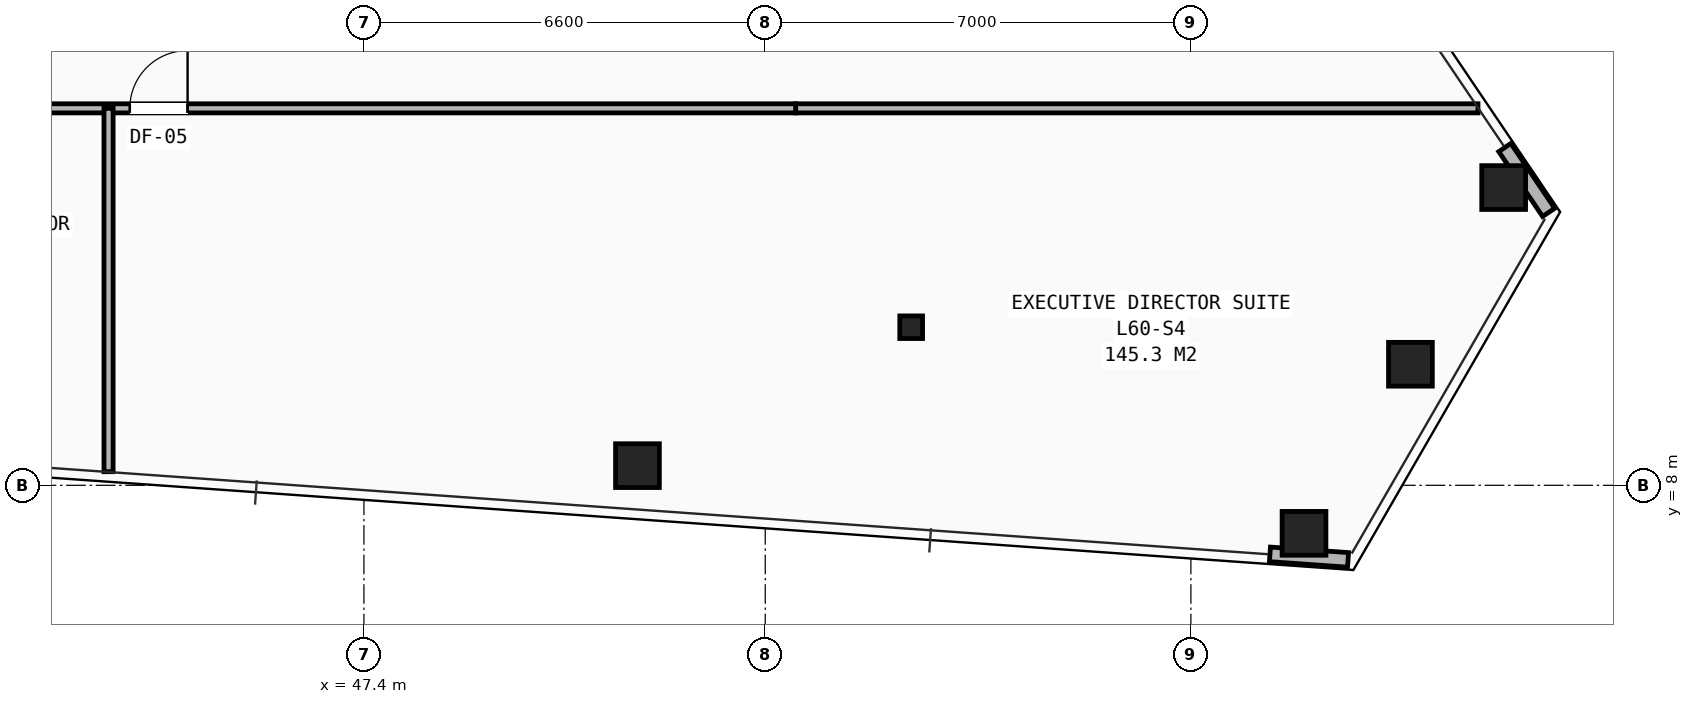
"""IFC4 building model, lengths in metres.
Left out: names, types, materials, properties, quantities, classifications, styles, units other than length and angle.
Written with IfcOpenShell. Run it as: python <this file> out.ifc"""

import sys

from ifc_helpers import new_model, si_unit, direction, frame, frame_2d, origin, origin_2d, place, context, subcontext, project, spatial, rectangle, hollow_rectangle, i_section, extrude, element, fill, save


model = new_model("IFC4")
c1 = context("Model", 3, precision=1e-05, world=origin(), true_north=direction((0.0, 1.0)))
c2 = subcontext(c1, "Body", "Model", "MODEL_VIEW")
j1 = project(units=[si_unit("LENGTHUNIT", "METRE"), si_unit("PLANEANGLEUNIT", "RADIAN")], contexts=[c1])
p1 = place(None, origin())
s1 = spatial("IfcSite", under=j1, at=p1, CompositionType="ELEMENT")
p2 = place(p1, origin())
s2 = spatial("IfcBuilding", under=s1, at=p2, CompositionType="ELEMENT")
p3 = place(p2, frame((0.0, 0.0, 211.9)))
s3 = spatial("IfcBuildingStorey", under=s2, at=p3, CompositionType="ELEMENT", Elevation=211.9)
p4 = place(p3, frame((56.4, 10.6, 0.0), z_axis=(0.0, 0.0, 1.0), x_axis=(1.0, 0.0, 0.0)))
e1 = element("IfcColumn", 1, at=p4, inside=s3, PredefinedType="COLUMN", context=c2, shape_type="SweptSolid", body=[
    extrude(i_section(OverallWidth=0.374, OverallDepth=0.372, WebThickness=0.016, FlangeThickness=0.026, at=origin_2d()), origin(), (0.0, 0.0, 1.0), 3.5),
])
for number, where, z_axis, x_axis in (
    (2, (51.898, 8.323, 0.0), (0.0, 0.0, 1.0), (1.0, 0.0, 0.0)),
    (3, (62.86, 7.21, 0.0), (0.0, 0.0, 1.0), (1.0, 0.0, 0.0)),
    (4, (64.611, 9.991, 0.0), (0.0, 0.0, 1.0), (1.0, 0.0, 0.0)),
    (5, (66.144, 12.897, 0.0), (0.0, 0.0, 1.0), (1.0, 0.0, 0.0)),
):
    element("IfcColumn", number, at=place(p3, frame(where, z_axis=z_axis, x_axis=x_axis)), inside=s3, PredefinedType="COLUMN", context=c2, shape_type="SweptSolid", body=[
        extrude(hollow_rectangle(XDim=0.72, YDim=0.72, WallThickness=0.05, at=origin_2d()), origin(), (0.0, 0.0, 1.0), 3.5),
    ])
p5 = place(p3, frame((62.3, 6.865, 0.0), z_axis=(0.0, 0.0, 1.0), x_axis=(0.997482703795, -0.070910194111, 0.0)))
e6 = element("IfcWall", 6, at=p5, inside=s3, PredefinedType="SHEAR", context=c2, shape_type="SweptSolid", body=[
    extrude(rectangle(XDim=1.288, YDim=0.24, at=frame_2d((0.644, 0.0))), origin(), (0.0, 0.0, 1.0), 2.623),
])
p6 = place(p3, frame((66.884, 12.489, 0.0), z_axis=(0.0, 0.0, 1.0), x_axis=(-0.559984079849, 0.828503367715, 0.0)))
e7 = element("IfcWall", 7, at=p6, inside=s3, PredefinedType="SHEAR", context=c2, shape_type="SweptSolid", body=[
    extrude(rectangle(XDim=1.287, YDim=0.24, at=frame_2d((0.644, 0.0))), origin(), (0.0, 0.0, 1.0), 2.623),
])
p7 = place(p3, frame((54.5, 14.2, 0.0), z_axis=(0.0, 0.0, 1.0), x_axis=(1.0, 0.0, 0.0)))
e8 = element("IfcWall", 8, at=p7, inside=s3, PredefinedType="PARTITIONING", context=c2, shape_type="SweptSolid", body=[
    extrude(rectangle(XDim=11.221, YDim=0.15, at=frame_2d((5.611, 0.0))), origin(), (0.0, 0.0, 1.0), 2.265),
])
p8 = place(p3, frame((25.5, 14.2, 0.0), z_axis=(0.0, 0.0, 1.0), x_axis=(1.0, 0.0, 0.0)))
e9 = element("IfcWall", 9, at=p8, inside=s3, PredefinedType="PARTITIONING", context=c2, shape_type="SweptSolid", body=[
    extrude(rectangle(XDim=29.0, YDim=0.15, at=frame_2d((14.5, 0.0))), origin(), (0.0, 0.0, 1.0), 2.265),
])
p9 = place(p8, frame((0.85, 0.0, 0.0)))
e10 = element("IfcOpeningElement", 10, at=p9, cuts=e9, PredefinedType="OPENING", context=c2, shape_type="SweptSolid", body=[
    extrude(rectangle(XDim=0.95, YDim=2.1, at=frame_2d((0.475, 1.05))), frame((0.0, 0.085, 0.0), z_axis=(0.0, -1.0, 0.0), x_axis=(1.0, 0.0, 0.0)), (0.0, 0.0, 1.0), 0.17),
])
p10 = place(p8, frame((8.25, 0.0, 0.0)))
e11 = element("IfcOpeningElement", 11, at=p10, cuts=e9, PredefinedType="OPENING", context=c2, shape_type="SweptSolid", body=[
    extrude(rectangle(XDim=0.95, YDim=2.1, at=frame_2d((0.475, 1.05))), frame((0.0, 0.085, 0.0), z_axis=(0.0, -1.0, 0.0), x_axis=(1.0, 0.0, 0.0)), (0.0, 0.0, 1.0), 0.17),
])
p11 = place(p8, frame((13.05, 0.0, 0.0)))
e12 = element("IfcOpeningElement", 12, at=p11, cuts=e9, PredefinedType="OPENING", context=c2, shape_type="SweptSolid", body=[
    extrude(rectangle(XDim=0.95, YDim=2.1, at=frame_2d((0.475, 1.05))), frame((0.0, 0.085, 0.0), z_axis=(0.0, -1.0, 0.0), x_axis=(1.0, 0.0, 0.0)), (0.0, 0.0, 1.0), 0.17),
])
p12 = place(p8, frame((18.05, 0.0, 0.0)))
e13 = element("IfcOpeningElement", 13, at=p12, cuts=e9, PredefinedType="OPENING", context=c2, shape_type="SweptSolid", body=[
    extrude(rectangle(XDim=0.95, YDim=2.1, at=frame_2d((0.475, 1.05))), frame((0.0, 0.085, 0.0), z_axis=(0.0, -1.0, 0.0), x_axis=(1.0, 0.0, 0.0)), (0.0, 0.0, 1.0), 0.17),
])
p13 = place(p3, frame((43.2, 8.224, 0.0), z_axis=(0.0, 0.0, 1.0), x_axis=(0.0, 1.0, 0.0)))
e14 = element("IfcWall", 14, at=p13, inside=s3, PredefinedType="PARTITIONING", context=c2, shape_type="SweptSolid", body=[
    extrude(rectangle(XDim=5.976, YDim=0.15, at=frame_2d((2.988, 0.0))), origin(), (0.0, 0.0, 1.0), 2.628),
])
p14 = place(p12, origin())
e15 = element("IfcDoor", 15, at=p14, inside=s3, OperationType="SINGLE_SWING_RIGHT", PredefinedType="DOOR", context=c2, shape_type="SweptSolid", body=[
    extrude(rectangle(XDim=0.95, YDim=2.1, at=frame_2d((0.475, 1.05))), frame((0.0, 0.025, 0.0), z_axis=(0.0, -1.0, 0.0), x_axis=(1.0, 0.0, 0.0)), (0.0, 0.0, 1.0), 0.05),
])
fill(e13, e15)
save(model, sys.argv[1])
